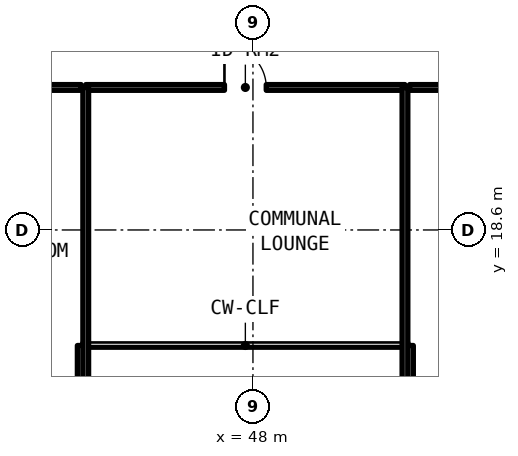
"""IFC4 building model, lengths in metres.
Left out: names, types, materials, properties, quantities, classifications, styles, units other than length and angle.
Written with IfcOpenShell. Run it as: python <this file> out.ifc"""

import sys

from ifc_helpers import new_model, si_unit, direction, frame, frame_2d, origin, place, context, subcontext, project, spatial, rectangle, extrude, element, fill, save


model = new_model("IFC4")
c1 = context("Model", 3, precision=1e-05, world=origin(), true_north=direction((0.0, 1.0)))
c2 = subcontext(c1, "Body", "Model", "MODEL_VIEW")
j1 = project(units=[si_unit("LENGTHUNIT", "METRE"), si_unit("PLANEANGLEUNIT", "RADIAN")], contexts=[c1])
p1 = place(None, origin())
s1 = spatial("IfcSite", under=j1, at=p1, CompositionType="ELEMENT")
p2 = place(p1, origin())
s2 = spatial("IfcBuilding", under=s1, at=p2, CompositionType="ELEMENT")
p3 = place(p2, frame((0.0, 0.0, 201.63)))
s3 = spatial("IfcBuildingStorey", under=s2, at=p3, CompositionType="ELEMENT", Elevation=201.63)
for number, where, z_axis, x_axis in (
    (1, (43.49, 12.16, 0.0), (0.0, 0.0, 1.0), (0.0, 1.0, 0.0)),
    (2, (52.11, 15.56, 0.0), (0.0, 0.0, 1.0), (0.0, -1.0, 0.0)),
):
    element("IfcWall", number, at=place(p3, frame(where, z_axis=z_axis, x_axis=x_axis)), inside=s3, PredefinedType="SOLIDWALL", context=c2, shape_type="SweptSolid", body=[
        extrude(rectangle(XDim=3.4, YDim=0.22, at=frame_2d((1.7, 0.0))), origin(), (0.0, 0.0, 1.0), 3.08),
    ])
p4 = place(p3, frame((43.6, 22.35, 0.0), z_axis=(0.0, 0.0, 1.0), x_axis=(1.0, 0.0, 0.0)))
e3 = element("IfcWall", 3, at=p4, inside=s3, PredefinedType="SOLIDWALL", context=c2, shape_type="SweptSolid", body=[
    extrude(rectangle(XDim=8.4, YDim=0.15, at=frame_2d((4.2, 0.0))), origin(), (0.0, 0.0, 1.0), 2.35),
])
p5 = place(p4, frame((3.65, 0.0, 0.0)))
e4 = element("IfcOpeningElement", 4, at=p5, cuts=e3, PredefinedType="OPENING", context=c2, shape_type="SweptSolid", body=[
    extrude(rectangle(XDim=1.1, YDim=2.15, at=frame_2d((0.55, 1.075))), frame((0.0, 0.085, 0.0), z_axis=(0.0, -1.0, 0.0), x_axis=(1.0, 0.0, 0.0)), (0.0, 0.0, 1.0), 0.17),
])
for number, where, z_axis, x_axis in (
    (5, (43.6, 12.27, 0.0), (0.0, 0.0, 1.0), (0.0, 1.0, 0.0)),
    (6, (52.0, 12.27, 0.0), (0.0, 0.0, 1.0), (0.0, 1.0, 0.0)),
):
    element("IfcWall", number, at=place(p3, frame(where, z_axis=z_axis, x_axis=x_axis)), inside=s3, PredefinedType="SOLIDWALL", context=c2, shape_type="SweptSolid", body=[
        extrude(rectangle(XDim=10.08, YDim=0.15, at=frame_2d((5.04, 0.0))), origin(), (0.0, 0.0, 1.0), 2.35),
    ])
p6 = place(p3, frame((38.713, 22.35, 0.0), z_axis=(0.0, 0.0, 1.0), x_axis=(1.0, 0.0, 0.0)))
e7 = element("IfcWall", 7, at=p6, inside=s3, PredefinedType="SOLIDWALL", context=c2, shape_type="SweptSolid", body=[
    extrude(rectangle(XDim=4.767, YDim=0.15, at=frame_2d((2.384, 0.0))), origin(), (0.0, 0.0, 1.0), 2.35),
])
p7 = place(p6, frame((2.632, 0.0, 0.0)))
e8 = element("IfcOpeningElement", 8, at=p7, cuts=e7, PredefinedType="OPENING", context=c2, shape_type="SweptSolid", body=[
    extrude(rectangle(XDim=0.95, YDim=2.15, at=frame_2d((0.475, 1.075))), frame((0.0, 0.085, 0.0), z_axis=(0.0, -1.0, 0.0), x_axis=(1.0, 0.0, 0.0)), (0.0, 0.0, 1.0), 0.17),
])
p8 = place(p3, frame((52.12, 22.35, 0.0), z_axis=(0.0, 0.0, 1.0), x_axis=(1.0, 0.0, 0.0)))
e9 = element("IfcWall", 9, at=p8, inside=s3, PredefinedType="SOLIDWALL", context=c2, shape_type="SweptSolid", body=[
    extrude(rectangle(XDim=5.619, YDim=0.15, at=frame_2d((2.81, 0.0))), origin(), (0.0, 0.0, 1.0), 2.35),
])
p9 = place(p8, frame((2.335, 0.0, 0.0)))
e10 = element("IfcOpeningElement", 10, at=p9, cuts=e9, PredefinedType="OPENING", context=c2, shape_type="SweptSolid", body=[
    extrude(rectangle(XDim=0.95, YDim=2.15, at=frame_2d((0.475, 1.075))), frame((0.0, 0.085, 0.0), z_axis=(0.0, -1.0, 0.0), x_axis=(1.0, 0.0, 0.0)), (0.0, 0.0, 1.0), 0.17),
])
p10 = place(p5, origin())
e11 = element("IfcDoor", 11, at=p10, inside=s3, OperationType="SINGLE_SWING_LEFT", PredefinedType="DOOR", context=c2, shape_type="SweptSolid", body=[
    extrude(rectangle(XDim=1.1, YDim=2.15, at=frame_2d((0.55, 1.075))), frame((0.0, 0.025, 0.0), z_axis=(0.0, -1.0, 0.0), x_axis=(1.0, 0.0, 0.0)), (0.0, 0.0, 1.0), 0.05),
])
fill(e4, e11)
save(model, sys.argv[1])
